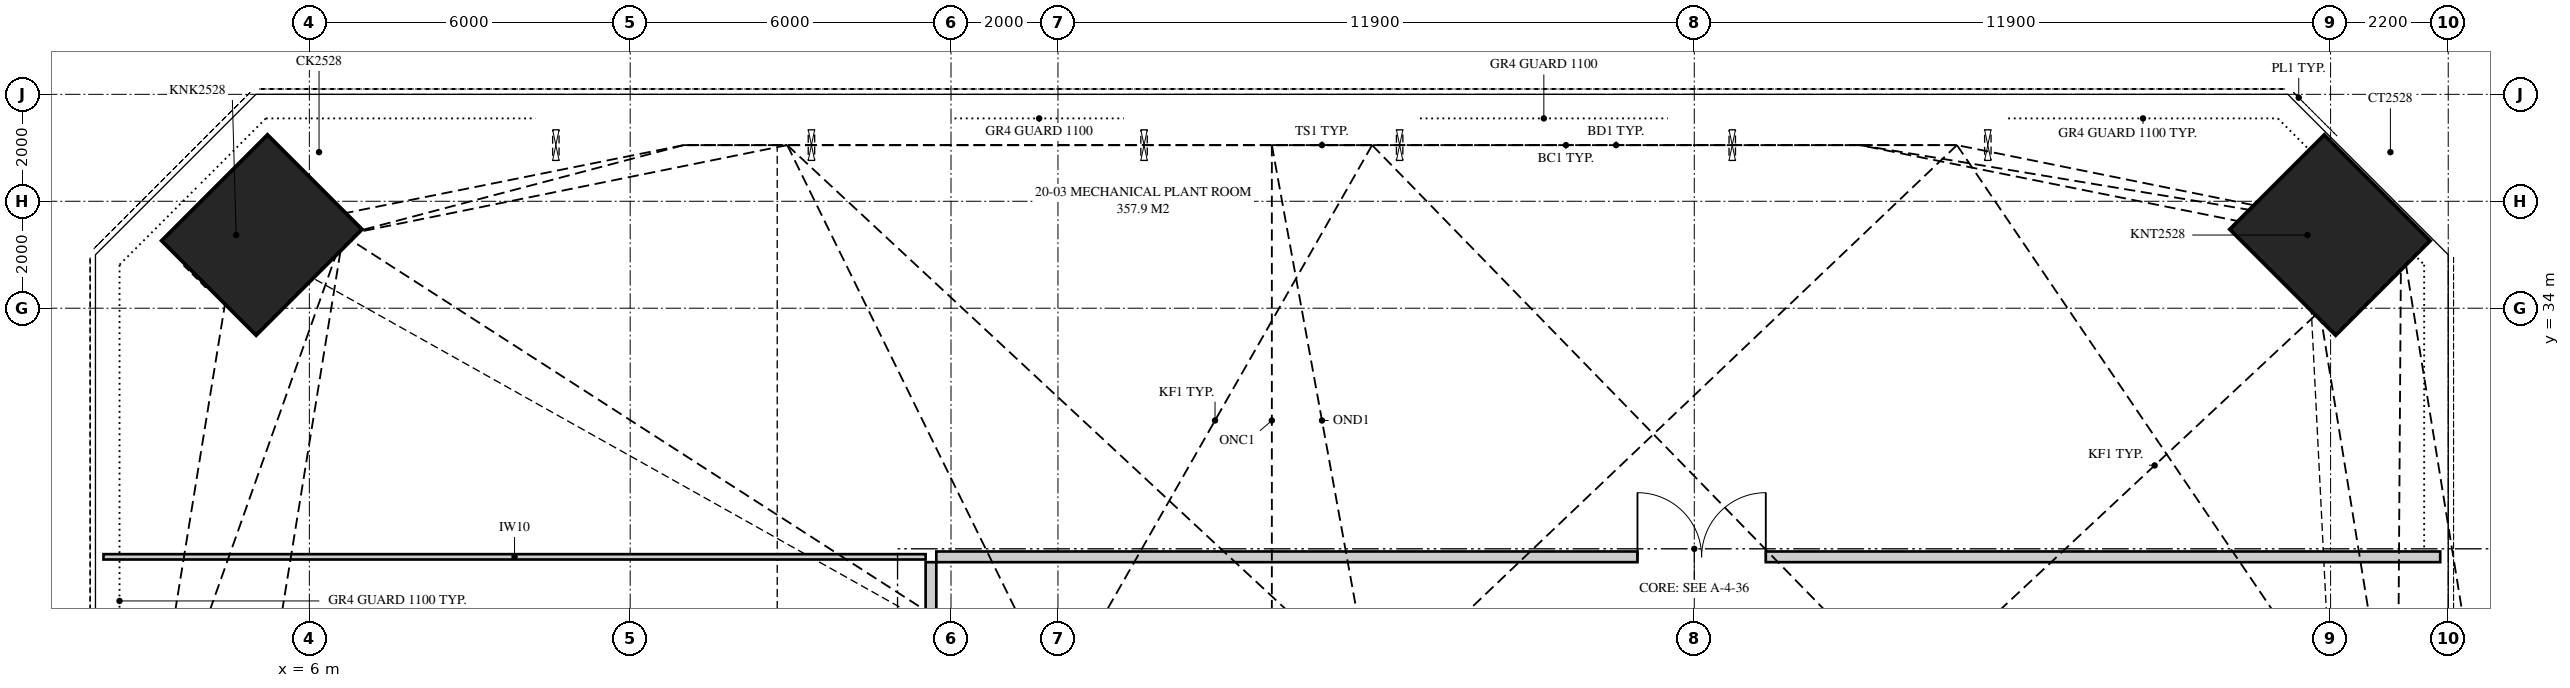
"""IFC4 building model, lengths in metres.
Left out: names, types, materials, properties, quantities, classifications, styles, units other than length and angle.
Written with IfcOpenShell. Run it as: python <this file> out.ifc"""

import sys

from ifc_helpers import new_model, si_unit, direction, frame, frame_2d, origin, origin_2d, place, context, subcontext, project, spatial, polyline, rectangle, hollow_rectangle, outline, extrude, element, fill, save


model = new_model("IFC4")
c1 = context("Model", 3, precision=1e-05, world=origin(), true_north=direction((0.0, 1.0)))
c2 = subcontext(c1, "Body", "Model", "MODEL_VIEW")
j1 = project(units=[si_unit("LENGTHUNIT", "METRE"), si_unit("PLANEANGLEUNIT", "RADIAN")], contexts=[c1])
p1 = place(None, origin())
s1 = spatial("IfcSite", under=j1, at=p1, CompositionType="ELEMENT")
p2 = place(p1, origin())
s2 = spatial("IfcBuilding", under=s1, at=p2, CompositionType="ELEMENT")
p3 = place(p2, frame((0.0, 0.0, 74.75)))
s3 = spatial("IfcBuildingStorey", under=s2, at=p3, CompositionType="ELEMENT", Elevation=74.75)
p4 = place(p3, frame((43.585, 35.369, 0.62), z_axis=(0.330350424728, 0.0, 0.943858356366), x_axis=(-0.647863070943, -0.727225506888, 0.22675207483)))
e1 = element("IfcColumn", 1, at=p4, inside=s3, PredefinedType="COLUMN", context=c2, shape_type="SweptSolid", body=[
    extrude(hollow_rectangle(XDim=2.5, YDim=2.8, WallThickness=0.25, at=origin_2d()), origin(), (0.0, 0.0, 1.0), 4.641),
])
p5 = place(p3, frame((4.91, 35.369, 0.697), z_axis=(0.371390676354, 0.0, 0.928476690885), x_axis=(0.631748504238, -0.732827974204, -0.252699401695)))
e2 = element("IfcColumn", 2, at=p5, inside=s3, PredefinedType="COLUMN", context=c2, shape_type="SweptSolid", body=[
    extrude(hollow_rectangle(XDim=2.5, YDim=2.8, WallThickness=0.175, at=origin_2d()), origin(), (0.0, 0.0, 1.0), 4.635),
])
p6 = place(p3, frame((17.725, 29.35, 0.0), z_axis=(0.0, 0.0, 1.0), x_axis=(1.0, 0.0, 0.0)))
e3 = element("IfcWall", 3, at=p6, inside=s3, PredefinedType="PARTITIONING", context=c2, shape_type="SweptSolid", body=[
    extrude(outline(polyline([(26.45, 0.0), (28.125, 0.0), (28.125, 0.453), (26.643, 0.453), (26.643, 2.002), (26.645, 2.103), (28.064, 2.107), (28.125, 2.107), (28.125, 3.32), (27.644, 3.32), (27.644, 4.72), (24.664, 4.72), (24.664, 4.141), (23.958, 4.141), (23.958, 4.72), (21.409, 4.72), (21.409, 4.141), (20.503, 4.141), (20.503, 4.72), (16.071, 4.72), (16.071, 4.141), (15.218, 4.141), (15.218, 4.72), (11.452, 4.72), (11.452, 4.141), (10.557, 4.141), (10.557, 4.72), (8.439, 4.72), (8.439, 4.194), (7.861, 4.194), (7.861, 4.72), (5.937, 4.72), (5.937, 4.141), (5.029, 4.141), (5.029, 4.72), (4.087, 4.72), (4.087, 4.141), (3.429, 4.141), (3.429, 4.72), (1.309, 4.72), (1.309, 4.141), (0.685, 4.141), (0.685, 4.72), (0.0, 4.72), (0.0, 0.0), (25.439, 0.0), (25.439, 1.5), (26.45, 1.5), (26.45, 0.0)]), holes=[polyline([(7.359, 3.349), (7.399, 3.453), (7.994, 3.504), (7.994, 2.988), (7.955, 2.883), (7.359, 2.832), (7.359, 3.349)])]), frame((0.0, 0.1, 0.0), z_axis=(0.0, -1.0, 0.0), x_axis=(1.0, 0.0, 0.0)), (0.0, 0.0, 1.0), 0.2),
])
p7 = place(p6, frame((13.113, 0.0, 0.0)))
e4 = element("IfcOpeningElement", 4, at=p7, cuts=e3, PredefinedType="OPENING", context=c2, shape_type="SweptSolid", body=[
    extrude(rectangle(XDim=2.4, YDim=2.4, at=frame_2d((1.2, 1.2))), frame((0.0, 0.11, 0.0), z_axis=(0.0, -1.0, 0.0), x_axis=(1.0, 0.0, 0.0)), (0.0, 0.0, 1.0), 0.22),
])
p8 = place(p3, frame((17.625, 27.7, 0.0), z_axis=(0.0, 0.0, 1.0), x_axis=(0.0, 1.0, 0.0)))
e5 = element("IfcWall", 5, at=p8, inside=s3, PredefinedType="PARTITIONING", context=c2, shape_type="SweptSolid", body=[
    extrude(outline(polyline([(1.55, 0.0), (1.55, 4.72), (0.927, 4.72), (0.927, 4.141), (0.236, 4.141), (0.236, 4.72), (0.0, 4.72), (0.0, 1.5), (1.011, 1.5), (1.011, 0.0), (1.55, 0.0)])), frame((0.0, 0.1, 0.0), z_axis=(0.0, -1.0, 0.0), x_axis=(1.0, 0.0, 0.0)), (0.0, 0.0, 1.0), 0.2),
])
p9 = place(p3, frame((2.15, 29.35, 0.0), z_axis=(0.0, 0.0, 1.0), x_axis=(1.0, 0.0, 0.0)))
e6 = element("IfcWall", 6, at=p9, inside=s3, PredefinedType="PARTITIONING", context=c2, shape_type="SweptSolid", body=[
    extrude(outline(polyline([(2.788, 4.72), (0.0, 4.72), (0.0, 0.0), (12.102, 0.0), (12.102, 1.5), (14.325, 1.5), (14.325, 0.0), (15.375, 0.0), (15.375, 4.72), (14.331, 4.72), (14.331, 4.141), (13.86, 4.141), (13.86, 3.92), (11.34, 3.92), (11.34, 4.72), (4.223, 4.72), (4.223, 3.32), (2.788, 3.32), (2.788, 4.72)]), holes=[polyline([(1.574, 0.378), (1.574, 1.916), (1.614, 1.967), (3.115, 2.183), (3.115, 0.645), (3.075, 0.593), (1.574, 0.378)])]), frame((0.0, 0.05, 0.0), z_axis=(0.0, -1.0, 0.0), x_axis=(1.0, 0.0, 0.0)), (0.0, 0.0, 1.0), 0.1),
])
p10 = place(p7, origin())
e7 = element("IfcDoor", 7, at=p10, inside=s3, OperationType="DOUBLE_DOOR_SINGLE_SWING", PredefinedType="DOOR", context=c2, shape_type="SweptSolid", body=[
    extrude(rectangle(XDim=2.4, YDim=2.4, at=frame_2d((1.2, 1.2))), frame((0.0, 0.025, 0.0), z_axis=(0.0, -1.0, 0.0), x_axis=(1.0, 0.0, 0.0)), (0.0, 0.0, 1.0), 0.05),
])
fill(e4, e7)
save(model, sys.argv[1])
